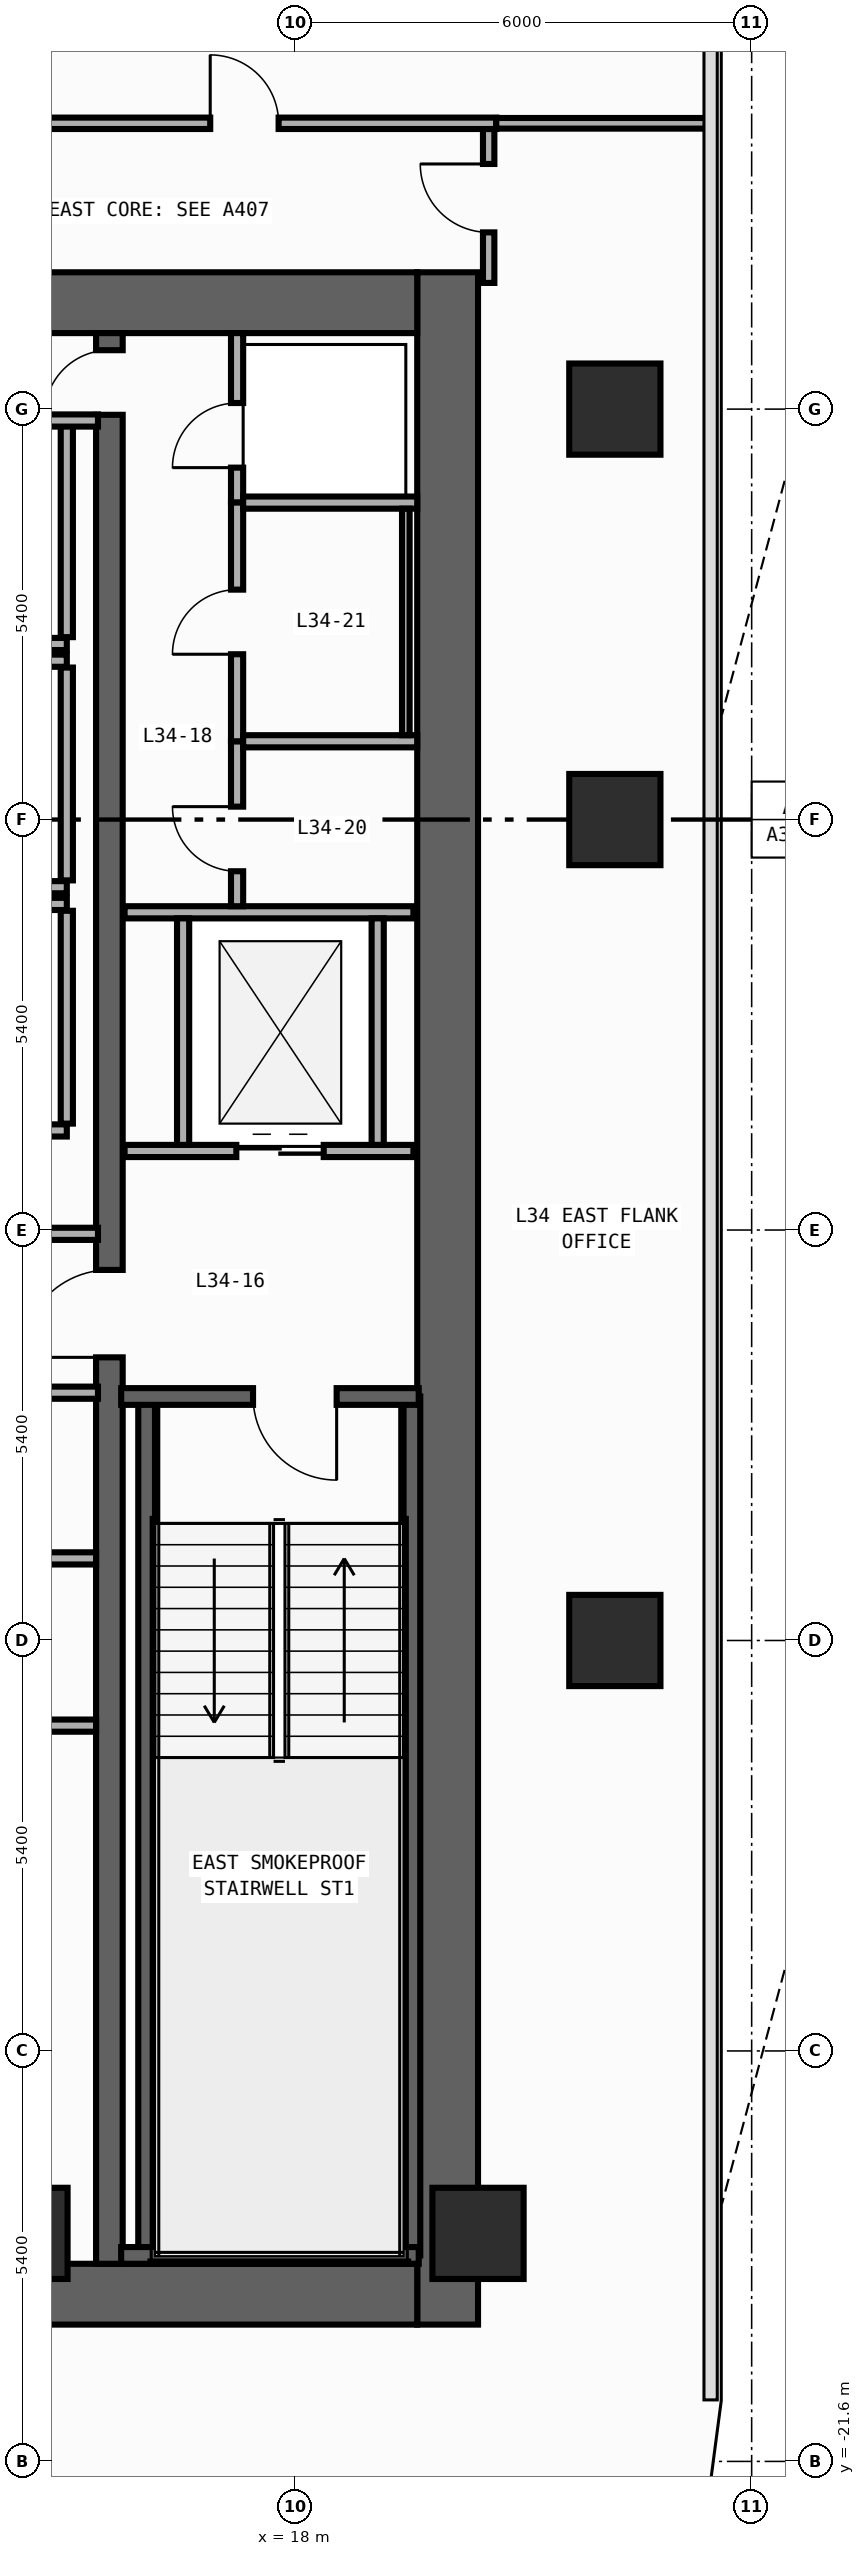
"""IFC4 building model, lengths in metres.
Left out: names, types, materials, properties, quantities, classifications, styles, units other than length and angle.
Written with IfcOpenShell. Run it as: python <this file> out.ifc"""

import sys

from ifc_helpers import new_model, si_unit, direction, frame, frame_2d, origin, origin_2d, place, context, subcontext, project, spatial, rectangle, extrude, element, fill, save


model = new_model("IFC4")
c1 = context("Model", 3, precision=1e-05, world=origin(), true_north=direction((0.0, 1.0)))
c2 = subcontext(c1, "Body", "Model", "MODEL_VIEW")
j1 = project(units=[si_unit("LENGTHUNIT", "METRE"), si_unit("PLANEANGLEUNIT", "RADIAN")], contexts=[c1])
p1 = place(None, origin())
s1 = spatial("IfcSite", under=j1, at=p1, CompositionType="ELEMENT")
p2 = place(p1, origin())
s2 = spatial("IfcBuilding", under=s1, at=p2, CompositionType="ELEMENT")
p3 = place(p2, frame((0.0, 0.0, 147.8)))
s3 = spatial("IfcBuildingStorey", under=s2, at=p3, CompositionType="ELEMENT", Elevation=147.8)
p4 = place(p3, frame((20.0, -19.8, 0.0), z_axis=(0.0, 0.0, 1.0), x_axis=(0.0, 1.0, 0.0)))
e1 = element("IfcWall", 1, at=p4, inside=s3, PredefinedType="SHEAR", context=c2, shape_type="SweptSolid", body=[
    extrude(rectangle(XDim=27.0, YDim=0.8, at=frame_2d((13.5, 0.0))), origin(), (0.0, 0.0, 1.0), 3.85),
])
for number, where, z_axis, x_axis in (
    (2, (12.8, -19.4, 0.0), (0.0, 0.0, 1.0), (1.0, 0.0, 0.0)),
    (3, (12.8, 6.8, 0.0), (0.0, 0.0, 1.0), (1.0, 0.0, 0.0)),
):
    element("IfcWall", number, at=place(p3, frame(where, z_axis=z_axis, x_axis=x_axis)), inside=s3, PredefinedType="SHEAR", context=c2, shape_type="SweptSolid", body=[
        extrude(rectangle(XDim=6.8, YDim=0.8, at=frame_2d((3.4, 0.0))), origin(), (0.0, 0.0, 1.0), 3.85),
    ])
p5 = place(p3, frame((15.55, -19.0, 0.0), z_axis=(0.0, 0.0, 1.0), x_axis=(0.0, 1.0, 0.0)))
e4 = element("IfcWall", 4, at=p5, inside=s3, PredefinedType="SHEAR", context=c2, shape_type="SweptSolid", body=[
    extrude(rectangle(XDim=25.4, YDim=0.35, at=frame_2d((12.7, 0.0))), origin(), (0.0, 0.0, 1.0), 3.85),
])
p6 = place(p5, frame((11.925, 0.0, 0.0)))
e5 = element("IfcOpeningElement", 5, at=p6, cuts=e4, PredefinedType="OPENING", context=c2, shape_type="SweptSolid", body=[
    extrude(rectangle(XDim=1.15, YDim=2.2, at=frame_2d((0.575, 1.1))), frame((0.0, 0.185, 0.0), z_axis=(0.0, -1.0, 0.0), x_axis=(1.0, 0.0, 0.0)), (0.0, 0.0, 1.0), 0.37),
])
p7 = place(p5, frame((24.325, 0.0, 0.0)))
e6 = element("IfcOpeningElement", 6, at=p7, cuts=e4, PredefinedType="OPENING", context=c2, shape_type="SweptSolid", body=[
    extrude(rectangle(XDim=0.85, YDim=2.1, at=frame_2d((0.425, 1.05))), frame((0.0, 0.185, 0.0), z_axis=(0.0, -1.0, 0.0), x_axis=(1.0, 0.0, 0.0)), (0.0, 0.0, 1.0), 0.37),
])
for number, where, z_axis, x_axis in (
    (7, (16.04, -18.89, 0.0), (0.0, 0.0, 1.0), (0.0, 1.0, 0.0)),
    (8, (19.53, -18.89, 0.0), (0.0, 0.0, 1.0), (0.0, 1.0, 0.0)),
):
    element("IfcWall", number, at=place(p3, frame(where, z_axis=z_axis, x_axis=x_axis)), inside=s3, PredefinedType="SHEAR", context=c2, shape_type="SweptSolid", body=[
        extrude(rectangle(XDim=11.3, YDim=0.22, at=frame_2d((5.65, 0.0))), origin(), (0.0, 0.0, 1.0), 3.85),
    ])
p8 = place(p3, frame((15.705, -18.89, 0.0), z_axis=(0.0, 0.0, 1.0), x_axis=(1.0, 0.0, 0.0)))
e9 = element("IfcWall", 9, at=p8, inside=s3, PredefinedType="SHEAR", context=c2, shape_type="SweptSolid", body=[
    extrude(rectangle(XDim=3.915, YDim=0.22, at=frame_2d((1.958, 0.0))), origin(), (0.0, 0.0, 1.0), 3.85),
])
p9 = place(p3, frame((19.62, -7.59, 0.0), z_axis=(0.0, 0.0, 1.0), x_axis=(-1.0, 0.0, 0.0)))
e10 = element("IfcWall", 10, at=p9, inside=s3, PredefinedType="SHEAR", context=c2, shape_type="SweptSolid", body=[
    extrude(rectangle(XDim=3.915, YDim=0.22, at=frame_2d((1.958, 0.0))), origin(), (0.0, 0.0, 1.0), 3.85),
])
p10 = place(p9, frame((1.08, 0.0, 0.0)))
e11 = element("IfcOpeningElement", 11, at=p10, cuts=e10, PredefinedType="OPENING", context=c2, shape_type="SweptSolid", body=[
    extrude(rectangle(XDim=1.1, YDim=2.2, at=frame_2d((0.55, 1.1))), frame((0.0, 0.12, 0.0), z_axis=(0.0, -1.0, 0.0), x_axis=(1.0, 0.0, 0.0)), (0.0, 0.0, 1.0), 0.24),
])
for number, where, z_axis, x_axis in (
    (12, (20.4, -18.6, 0.0), (0.0, 0.0, 1.0), (1.0, 0.0, 0.0)),
    (13, (14.4, -18.6, 0.0), (0.0, 0.0, 1.0), (1.0, 0.0, 0.0)),
    (14, (22.2, -10.8, 0.0), (0.0, 0.0, 1.0), (1.0, 0.0, 0.0)),
    (15, (22.2, 0.0, 0.0), (0.0, 0.0, 1.0), (1.0, 0.0, 0.0)),
    (16, (22.2, 5.4, 0.0), (0.0, 0.0, 1.0), (1.0, 0.0, 0.0)),
):
    element("IfcColumn", number, at=place(p3, frame(where, z_axis=z_axis, x_axis=x_axis)), inside=s3, PredefinedType="COLUMN", context=c2, shape_type="SweptSolid", body=[
        extrude(rectangle(XDim=1.2, YDim=1.2, at=origin_2d()), origin(), (0.0, 0.0, 1.0), 4.2),
    ])
p11 = place(p3, frame((12.8, 2.31, 0.0), z_axis=(0.0, 0.0, 1.0), x_axis=(1.0, 0.0, 0.0)))
e17 = element("IfcWall", 17, at=p11, inside=s3, PredefinedType="STANDARD", context=c2, shape_type="SweptSolid", body=[
    extrude(rectangle(XDim=2.19, YDim=0.16, at=frame_2d((1.095, 0.0))), origin(), (0.0, 0.0, 1.0), 3.85),
])
p12 = place(p3, frame((14.99, 2.4, 0.0), z_axis=(0.0, 0.0, 1.0), x_axis=(0.0, 1.0, 0.0)))
e18 = element("IfcWall", 18, at=p12, inside=s3, PredefinedType="STANDARD", context=c2, shape_type="SweptSolid", body=[
    extrude(rectangle(XDim=2.8, YDim=0.16, at=frame_2d((1.4, 0.0))), origin(), (0.0, 0.0, 1.0), 3.85),
])
for number, where, z_axis, x_axis in (
    (19, (12.8, -0.89, 0.0), (0.0, 0.0, 1.0), (1.0, 0.0, 0.0)),
    (20, (12.8, 2.09, 0.0), (0.0, 0.0, 1.0), (1.0, 0.0, 0.0)),
):
    element("IfcWall", number, at=place(p3, frame(where, z_axis=z_axis, x_axis=x_axis)), inside=s3, PredefinedType="STANDARD", context=c2, shape_type="SweptSolid", body=[
        extrude(rectangle(XDim=2.19, YDim=0.16, at=frame_2d((1.095, 0.0))), origin(), (0.0, 0.0, 1.0), 3.85),
    ])
p13 = place(p3, frame((14.99, -0.8, 0.0), z_axis=(0.0, 0.0, 1.0), x_axis=(0.0, 1.0, 0.0)))
e21 = element("IfcWall", 21, at=p13, inside=s3, PredefinedType="STANDARD", context=c2, shape_type="SweptSolid", body=[
    extrude(rectangle(XDim=2.8, YDim=0.16, at=frame_2d((1.4, 0.0))), origin(), (0.0, 0.0, 1.0), 3.85),
])
for number, where, z_axis, x_axis in (
    (22, (12.8, -4.09, 0.0), (0.0, 0.0, 1.0), (1.0, 0.0, 0.0)),
    (23, (12.8, -1.11, 0.0), (0.0, 0.0, 1.0), (1.0, 0.0, 0.0)),
):
    element("IfcWall", number, at=place(p3, frame(where, z_axis=z_axis, x_axis=x_axis)), inside=s3, PredefinedType="STANDARD", context=c2, shape_type="SweptSolid", body=[
        extrude(rectangle(XDim=2.19, YDim=0.16, at=frame_2d((1.095, 0.0))), origin(), (0.0, 0.0, 1.0), 3.85),
    ])
p14 = place(p3, frame((14.99, -4.0, 0.0), z_axis=(0.0, 0.0, 1.0), x_axis=(0.0, 1.0, 0.0)))
e24 = element("IfcWall", 24, at=p14, inside=s3, PredefinedType="STANDARD", context=c2, shape_type="SweptSolid", body=[
    extrude(rectangle(XDim=2.8, YDim=0.16, at=frame_2d((1.4, 0.0))), origin(), (0.0, 0.0, 1.0), 3.85),
])
p15 = place(p3, frame((15.75, -4.36, 0.0), z_axis=(0.0, 0.0, 1.0), x_axis=(1.0, 0.0, 0.0)))
e25 = element("IfcWall", 25, at=p15, inside=s3, PredefinedType="STANDARD", context=c2, shape_type="SweptSolid", body=[
    extrude(rectangle(XDim=3.8, YDim=0.16, at=frame_2d((1.9, 0.0))), origin(), (0.0, 0.0, 1.0), 3.85),
])
p16 = place(p15, frame((1.47, 0.0, 0.0)))
e26 = element("IfcOpeningElement", 26, at=p16, cuts=e25, PredefinedType="OPENING", context=c2, shape_type="SweptSolid", body=[
    extrude(rectangle(XDim=1.15, YDim=2.2, at=frame_2d((0.575, 1.1))), frame((0.0, 0.09, 0.0), z_axis=(0.0, -1.0, 0.0), x_axis=(1.0, 0.0, 0.0)), (0.0, 0.0, 1.0), 0.18),
])
p17 = place(p3, frame((15.75, -1.22, 0.0), z_axis=(0.0, 0.0, 1.0), x_axis=(1.0, 0.0, 0.0)))
e27 = element("IfcWall", 27, at=p17, inside=s3, PredefinedType="STANDARD", context=c2, shape_type="SweptSolid", body=[
    extrude(rectangle(XDim=3.8, YDim=0.16, at=frame_2d((1.9, 0.0))), origin(), (0.0, 0.0, 1.0), 3.85),
])
for number, where, z_axis, x_axis in (
    (28, (16.52, -4.28, 0.0), (0.0, 0.0, 1.0), (0.0, 1.0, 0.0)),
    (29, (19.08, -4.28, 0.0), (0.0, 0.0, 1.0), (0.0, 1.0, 0.0)),
):
    element("IfcWall", number, at=place(p3, frame(where, z_axis=z_axis, x_axis=x_axis)), inside=s3, PredefinedType="STANDARD", context=c2, shape_type="SweptSolid", body=[
        extrude(rectangle(XDim=2.98, YDim=0.16, at=frame_2d((1.49, 0.0))), origin(), (0.0, 0.0, 1.0), 3.85),
    ])
for number, where, z_axis, x_axis in (
    (30, (12.8, -5.45, 0.0), (0.0, 0.0, 1.0), (1.0, 0.0, 0.0)),
    (31, (12.8, -7.54, 0.0), (0.0, 0.0, 1.0), (1.0, 0.0, 0.0)),
    (32, (12.8, 5.25, 0.0), (0.0, 0.0, 1.0), (1.0, 0.0, 0.0)),
):
    element("IfcWall", number, at=place(p3, frame(where, z_axis=z_axis, x_axis=x_axis)), inside=s3, PredefinedType="STANDARD", context=c2, shape_type="SweptSolid", body=[
        extrude(rectangle(XDim=2.6, YDim=0.16, at=frame_2d((1.3, 0.0))), origin(), (0.0, 0.0, 1.0), 3.85),
    ])
p18 = place(p3, frame((17.23, 4.17, 0.0), z_axis=(0.0, 0.0, 1.0), x_axis=(0.0, 1.0, 0.0)))
e33 = element("IfcWall", 33, at=p18, inside=s3, PredefinedType="PARTITIONING", context=c2, shape_type="SweptSolid", body=[
    extrude(rectangle(XDim=2.23, YDim=0.16, at=frame_2d((1.115, 0.0))), origin(), (0.0, 0.0, 1.0), 3.85),
])
p19 = place(p18, frame((0.46, 0.0, 0.0)))
e34 = element("IfcOpeningElement", 34, at=p19, cuts=e33, PredefinedType="OPENING", context=c2, shape_type="SweptSolid", body=[
    extrude(rectangle(XDim=0.85, YDim=2.1, at=frame_2d((0.425, 1.05))), frame((0.0, 0.09, 0.0), z_axis=(0.0, -1.0, 0.0), x_axis=(1.0, 0.0, 0.0)), (0.0, 0.0, 1.0), 0.18),
])
p20 = place(p3, frame((17.23, -1.14, 0.0), z_axis=(0.0, 0.0, 1.0), x_axis=(0.0, 1.0, 0.0)))
e35 = element("IfcWall", 35, at=p20, inside=s3, PredefinedType="PARTITIONING", context=c2, shape_type="SweptSolid", body=[
    extrude(rectangle(XDim=2.17, YDim=0.16, at=frame_2d((1.085, 0.0))), origin(), (0.0, 0.0, 1.0), 3.85),
])
p21 = place(p20, frame((0.46, 0.0, 0.0)))
e36 = element("IfcOpeningElement", 36, at=p21, cuts=e35, PredefinedType="OPENING", context=c2, shape_type="SweptSolid", body=[
    extrude(rectangle(XDim=0.85, YDim=2.1, at=frame_2d((0.425, 1.05))), frame((0.0, 0.09, 0.0), z_axis=(0.0, -1.0, 0.0), x_axis=(1.0, 0.0, 0.0)), (0.0, 0.0, 1.0), 0.18),
])
p22 = place(p3, frame((17.23, 1.03, 0.0), z_axis=(0.0, 0.0, 1.0), x_axis=(0.0, 1.0, 0.0)))
e37 = element("IfcWall", 37, at=p22, inside=s3, PredefinedType="PARTITIONING", context=c2, shape_type="SweptSolid", body=[
    extrude(rectangle(XDim=3.14, YDim=0.16, at=frame_2d((1.57, 0.0))), origin(), (0.0, 0.0, 1.0), 3.85),
])
p23 = place(p22, frame((1.145, 0.0, 0.0)))
e38 = element("IfcOpeningElement", 38, at=p23, cuts=e37, PredefinedType="OPENING", context=c2, shape_type="SweptSolid", body=[
    extrude(rectangle(XDim=0.85, YDim=2.1, at=frame_2d((0.425, 1.05))), frame((0.0, 0.09, 0.0), z_axis=(0.0, -1.0, 0.0), x_axis=(1.0, 0.0, 0.0)), (0.0, 0.0, 1.0), 0.18),
])
for number, where, z_axis, x_axis in (
    (39, (17.31, 4.17, 0.0), (0.0, 0.0, 1.0), (1.0, 0.0, 0.0)),
    (40, (17.31, 1.03, 0.0), (0.0, 0.0, 1.0), (1.0, 0.0, 0.0)),
):
    element("IfcWall", number, at=place(p3, frame(where, z_axis=z_axis, x_axis=x_axis)), inside=s3, PredefinedType="PARTITIONING", context=c2, shape_type="SweptSolid", body=[
        extrude(rectangle(XDim=2.29, YDim=0.16, at=frame_2d((1.145, 0.0))), origin(), (0.0, 0.0, 1.0), 3.85),
    ])
for number, where, z_axis, x_axis in (
    (41, (12.31, -11.92, 0.0), (0.0, 0.0, 1.0), (1.0, 0.0, 0.0)),
    (42, (12.31, -9.72, 0.0), (0.0, 0.0, 1.0), (1.0, 0.0, 0.0)),
):
    element("IfcWall", number, at=place(p3, frame(where, z_axis=z_axis, x_axis=x_axis)), inside=s3, PredefinedType="PARTITIONING", context=c2, shape_type="SweptSolid", body=[
        extrude(rectangle(XDim=3.065, YDim=0.16, at=frame_2d((1.532, 0.0))), origin(), (0.0, 0.0, 1.0), 3.85),
    ])
p24 = place(p3, frame((20.54, 7.06, 0.0), z_axis=(0.0, 0.0, 1.0), x_axis=(0.0, 1.0, 0.0)))
e43 = element("IfcWall", 43, at=p24, inside=s3, PredefinedType="PARTITIONING", context=c2, shape_type="SweptSolid", body=[
    extrude(rectangle(XDim=2.025, YDim=0.15, at=frame_2d((1.012, 0.0))), origin(), (0.0, 0.0, 1.0), 3.85),
])
p25 = place(p24, frame((0.665, 0.0, 0.0)))
e44 = element("IfcOpeningElement", 44, at=p25, cuts=e43, PredefinedType="OPENING", context=c2, shape_type="SweptSolid", body=[
    extrude(rectangle(XDim=0.9, YDim=2.15, at=frame_2d((0.45, 1.075))), frame((0.0, 0.085, 0.0), z_axis=(0.0, -1.0, 0.0), x_axis=(1.0, 0.0, 0.0)), (0.0, 0.0, 1.0), 0.17),
])
p26 = place(p3, frame((11.81, 9.16, 0.0), z_axis=(0.0, 0.0, 1.0), x_axis=(1.0, 0.0, 0.0)))
e45 = element("IfcWall", 45, at=p26, inside=s3, PredefinedType="PARTITIONING", context=c2, shape_type="SweptSolid", body=[
    extrude(rectangle(XDim=8.83, YDim=0.15, at=frame_2d((4.415, 0.0))), origin(), (0.0, 0.0, 1.0), 3.85),
])
p27 = place(p26, frame((5.067, 0.0, 0.0)))
e46 = element("IfcOpeningElement", 46, at=p27, cuts=e45, PredefinedType="OPENING", context=c2, shape_type="SweptSolid", body=[
    extrude(rectangle(XDim=0.9, YDim=2.15, at=frame_2d((0.45, 1.075))), frame((0.0, 0.085, 0.0), z_axis=(0.0, -1.0, 0.0), x_axis=(1.0, 0.0, 0.0)), (0.0, 0.0, 1.0), 0.17),
])
p28 = place(p3, frame((20.64, 9.16, 0.0), z_axis=(0.0, 0.0, 1.0), x_axis=(1.0, 0.0, 0.0)))
e47 = element("IfcWall", 47, at=p28, inside=s3, PredefinedType="PARTITIONING", context=c2, shape_type="SweptSolid", body=[
    extrude(rectangle(XDim=2.815, YDim=0.14, at=frame_2d((1.408, 0.0))), origin(), (0.0, 0.0, 1.0), 3.85),
])
p29 = place(p3, frame((19.45, 4.09, 0.0), z_axis=(0.0, 0.0, 1.0), x_axis=(0.0, -1.0, 0.0)))
e48 = element("IfcWall", 48, at=p29, inside=s3, PredefinedType="PARTITIONING", context=c2, shape_type="SweptSolid", body=[
    extrude(rectangle(XDim=2.98, YDim=0.1, at=frame_2d((1.49, 0.0))), origin(), (0.0, 0.0, 1.0), 3.85),
])
p30 = place(p10, origin())
e49 = element("IfcDoor", 49, at=p30, inside=s3, OperationType="SINGLE_SWING_LEFT", PredefinedType="DOOR", context=c2, shape_type="SweptSolid", body=[
    extrude(rectangle(XDim=1.1, YDim=2.2, at=frame_2d((0.55, 1.1))), frame((0.0, 0.025, 0.0), z_axis=(0.0, -1.0, 0.0), x_axis=(1.0, 0.0, 0.0)), (0.0, 0.0, 1.0), 0.05),
])
fill(e11, e49)
p31 = place(p6, origin())
e50 = element("IfcDoor", 50, at=p31, inside=s3, OperationType="SINGLE_SWING_LEFT", PredefinedType="DOOR", context=c2, shape_type="SweptSolid", body=[
    extrude(rectangle(XDim=1.15, YDim=2.2, at=frame_2d((0.575, 1.1))), frame((0.0, 0.025, 0.0), z_axis=(0.0, -1.0, 0.0), x_axis=(1.0, 0.0, 0.0)), (0.0, 0.0, 1.0), 0.05),
])
fill(e5, e50)
p32 = place(p7, origin())
e51 = element("IfcDoor", 51, at=p32, inside=s3, OperationType="SINGLE_SWING_LEFT", PredefinedType="DOOR", context=c2, shape_type="SweptSolid", body=[
    extrude(rectangle(XDim=0.85, YDim=2.1, at=frame_2d((0.425, 1.05))), frame((0.0, 0.025, 0.0), z_axis=(0.0, -1.0, 0.0), x_axis=(1.0, 0.0, 0.0)), (0.0, 0.0, 1.0), 0.05),
])
fill(e6, e51)
p33 = place(p16, origin())
e52 = element("IfcDoor", 52, at=p33, inside=s3, OperationType="DOUBLE_DOOR_SLIDING", PredefinedType="DOOR", context=c2, shape_type="SweptSolid", body=[
    extrude(rectangle(XDim=1.15, YDim=2.2, at=frame_2d((0.575, 1.1))), frame((0.0, 0.025, 0.0), z_axis=(0.0, -1.0, 0.0), x_axis=(1.0, 0.0, 0.0)), (0.0, 0.0, 1.0), 0.05),
])
fill(e26, e52)
p34 = place(p19, origin())
e53 = element("IfcDoor", 53, at=p34, inside=s3, OperationType="SINGLE_SWING_LEFT", PredefinedType="DOOR", context=c2, shape_type="SweptSolid", body=[
    extrude(rectangle(XDim=0.85, YDim=2.1, at=frame_2d((0.425, 1.05))), frame((0.0, 0.025, 0.0), z_axis=(0.0, -1.0, 0.0), x_axis=(1.0, 0.0, 0.0)), (0.0, 0.0, 1.0), 0.05),
])
fill(e34, e53)
p35 = place(p21, origin())
e54 = element("IfcDoor", 54, at=p35, inside=s3, OperationType="SINGLE_SWING_RIGHT", PredefinedType="DOOR", context=c2, shape_type="SweptSolid", body=[
    extrude(rectangle(XDim=0.85, YDim=2.1, at=frame_2d((0.425, 1.05))), frame((0.0, 0.025, 0.0), z_axis=(0.0, -1.0, 0.0), x_axis=(1.0, 0.0, 0.0)), (0.0, 0.0, 1.0), 0.05),
])
fill(e36, e54)
p36 = place(p23, origin())
e55 = element("IfcDoor", 55, at=p36, inside=s3, OperationType="SINGLE_SWING_LEFT", PredefinedType="DOOR", context=c2, shape_type="SweptSolid", body=[
    extrude(rectangle(XDim=0.85, YDim=2.1, at=frame_2d((0.425, 1.05))), frame((0.0, 0.025, 0.0), z_axis=(0.0, -1.0, 0.0), x_axis=(1.0, 0.0, 0.0)), (0.0, 0.0, 1.0), 0.05),
])
fill(e38, e55)
p37 = place(p25, origin())
e56 = element("IfcDoor", 56, at=p37, inside=s3, OperationType="SINGLE_SWING_RIGHT", PredefinedType="DOOR", context=c2, shape_type="SweptSolid", body=[
    extrude(rectangle(XDim=0.9, YDim=2.15, at=frame_2d((0.45, 1.075))), frame((0.0, 0.025, 0.0), z_axis=(0.0, -1.0, 0.0), x_axis=(1.0, 0.0, 0.0)), (0.0, 0.0, 1.0), 0.05),
])
fill(e44, e56)
p38 = place(p27, origin())
e57 = element("IfcDoor", 57, at=p38, inside=s3, OperationType="SINGLE_SWING_LEFT", PredefinedType="DOOR", context=c2, shape_type="SweptSolid", body=[
    extrude(rectangle(XDim=0.9, YDim=2.15, at=frame_2d((0.45, 1.075))), frame((0.0, 0.025, 0.0), z_axis=(0.0, -1.0, 0.0), x_axis=(1.0, 0.0, 0.0)), (0.0, 0.0, 1.0), 0.05),
])
fill(e46, e57)
save(model, sys.argv[1])
